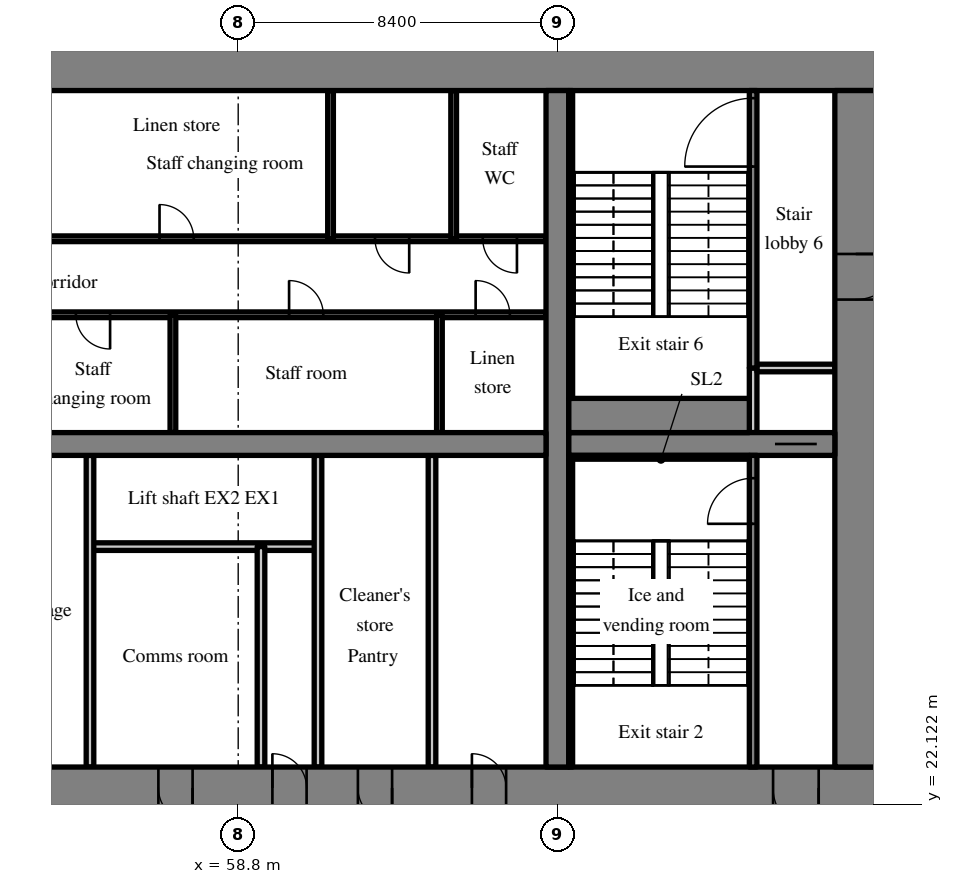
"""IFC4 building model, lengths in metres.
Left out: names, types, materials, properties, quantities, classifications, styles, units other than length and angle.
Written with IfcOpenShell. Run it as: python <this file> out.ifc"""

import sys

from ifc_helpers import new_model, si_unit, direction, frame, frame_2d, origin, place, context, subcontext, project, spatial, rectangle, extrude, source, transform, mapped, element, fill, save


model = new_model("IFC4")
c1 = context("Model", 3, precision=1e-05, world=origin(), true_north=direction((0.0, 1.0)))
c2 = subcontext(c1, "Body", "Model", "MODEL_VIEW")
j1 = project(units=[si_unit("LENGTHUNIT", "METRE"), si_unit("PLANEANGLEUNIT", "RADIAN")], contexts=[c1])
p1 = place(None, origin())
s1 = spatial("IfcSite", under=j1, at=p1, CompositionType="ELEMENT")
p2 = place(p1, origin())
s2 = spatial("IfcBuilding", under=s1, at=p2, CompositionType="ELEMENT")
p3 = place(p2, frame((0.0, 0.0, 6.0)))
s3 = spatial("IfcBuildingStorey", under=s2, at=p3, CompositionType="ELEMENT", Elevation=6.0)
m1 = source(origin(), c2, "Body", "SweptSolid", [
    extrude(rectangle(XDim=50.4, YDim=1.1, at=frame_2d((25.2, 0.0))), origin(), (0.0, 0.0, 1.0), 5.12),
])
p4 = place(p3, frame((25.2, 22.55, 0.0), z_axis=(0.0, 0.0, 1.0), x_axis=(1.0, 0.0, 0.0)))
e1 = element("IfcWall", 1, at=p4, inside=s3, PredefinedType="SHEAR", context=c2, shape_type="MappedRepresentation", body=[
    mapped(m1, transform((0.0, 0.0, 0.0), scale=1.0)),
])
m2 = source(origin(), c2, "Body", "SweptSolid", [
    extrude(rectangle(XDim=1.8, YDim=2.1, at=frame_2d((0.9, 1.05))), frame((0.0, 0.56, 0.0), z_axis=(0.0, -1.0, 0.0), x_axis=(1.0, 0.0, 0.0)), (0.0, 0.0, 1.0), 1.12),
])
p5 = place(p4, frame((15.9, 0.0, 0.0)))
e2 = element("IfcOpeningElement", 2, at=p5, cuts=e1, PredefinedType="OPENING", context=c2, shape_type="MappedRepresentation", body=[
    mapped(m2, transform((0.0, 0.0, 0.0), scale=1.0)),
])
m3 = source(origin(), c2, "Body", "SweptSolid", [
    extrude(rectangle(XDim=1.2, YDim=2.1, at=frame_2d((0.6, 1.05))), frame((0.0, 0.56, 0.0), z_axis=(0.0, -1.0, 0.0), x_axis=(1.0, 0.0, 0.0)), (0.0, 0.0, 1.0), 1.12),
])
p6 = place(p4, frame((27.0, 0.0, 0.0)))
e3 = element("IfcOpeningElement", 3, at=p6, cuts=e1, PredefinedType="OPENING", context=c2, shape_type="MappedRepresentation", body=[
    mapped(m3, transform((0.0, 0.0, 0.0), scale=1.0)),
])
m4 = source(origin(), c2, "Body", "SweptSolid", [
    extrude(rectangle(XDim=0.9, YDim=2.1, at=frame_2d((0.45, 1.05))), frame((0.0, 0.56, 0.0), z_axis=(0.0, -1.0, 0.0), x_axis=(1.0, 0.0, 0.0)), (0.0, 0.0, 1.0), 1.12),
])
p7 = place(p4, frame((34.5, 0.0, 0.0)))
e4 = element("IfcOpeningElement", 4, at=p7, cuts=e1, PredefinedType="OPENING", context=c2, shape_type="MappedRepresentation", body=[
    mapped(m4, transform((0.0, 0.0, 0.0), scale=1.0)),
])
p8 = place(p4, frame((31.5, 0.0, 0.0)))
e5 = element("IfcOpeningElement", 5, at=p8, cuts=e1, PredefinedType="OPENING", context=c2, shape_type="MappedRepresentation", body=[
    mapped(m4, transform((0.0, 0.0, 0.0), scale=1.0)),
])
p9 = place(p4, frame((39.75, 0.0, 0.0)))
e6 = element("IfcOpeningElement", 6, at=p9, cuts=e1, PredefinedType="OPENING", context=c2, shape_type="MappedRepresentation", body=[
    mapped(m4, transform((0.0, 0.0, 0.0), scale=1.0)),
])
p10 = place(p4, frame((36.75, 0.0, 0.0)))
e7 = element("IfcOpeningElement", 7, at=p10, cuts=e1, PredefinedType="OPENING", context=c2, shape_type="MappedRepresentation", body=[
    mapped(m4, transform((0.0, 0.0, 0.0), scale=1.0)),
])
p11 = place(p4, frame((6.425, 0.0, 0.0)))
e8 = element("IfcOpeningElement", 8, at=p11, cuts=e1, PredefinedType="OPENING", context=c2, shape_type="MappedRepresentation", body=[
    mapped(m3, transform((0.0, 0.0, 0.0), scale=1.0)),
])
p12 = place(p4, frame((47.675, 0.0, 0.0)))
e9 = element("IfcOpeningElement", 9, at=p12, cuts=e1, PredefinedType="OPENING", context=c2, shape_type="MappedRepresentation", body=[
    mapped(m3, transform((0.0, 0.0, 0.0), scale=1.0)),
])
p13 = place(p3, frame((25.2, 41.45, 0.0), z_axis=(0.0, 0.0, 1.0), x_axis=(1.0, 0.0, 0.0)))
e10 = element("IfcWall", 10, at=p13, inside=s3, PredefinedType="SHEAR", context=c2, shape_type="MappedRepresentation", body=[
    mapped(m1, transform((0.0, 0.0, 0.0), scale=1.0)),
])
m5 = source(origin(), c2, "Body", "SweptSolid", [
    extrude(rectangle(XDim=17.8, YDim=1.1, at=frame_2d((8.9, 0.0))), origin(), (0.0, 0.0, 1.0), 5.12),
])
p14 = place(p3, frame((75.05, 23.1, 0.0), z_axis=(0.0, 0.0, 1.0), x_axis=(0.0, 1.0, 0.0)))
e11 = element("IfcWall", 11, at=p14, inside=s3, PredefinedType="SHEAR", context=c2, shape_type="MappedRepresentation", body=[
    mapped(m5, transform((0.0, 0.0, 0.0), scale=1.0)),
])
p15 = place(p14, frame((12.3, 0.0, 0.0)))
e12 = element("IfcOpeningElement", 12, at=p15, cuts=e11, PredefinedType="OPENING", context=c2, shape_type="MappedRepresentation", body=[
    mapped(m3, transform((0.0, 0.0, 0.0), scale=1.0)),
])
m6 = source(origin(), c2, "Body", "SweptSolid", [
    extrude(rectangle(XDim=17.8, YDim=0.6, at=frame_2d((8.9, 0.0))), origin(), (0.0, 0.0, 1.0), 5.12),
])
p16 = place(p3, frame((67.2, 23.1, 0.0), z_axis=(0.0, 0.0, 1.0), x_axis=(0.0, 1.0, 0.0)))
e13 = element("IfcWall", 13, at=p16, inside=s3, PredefinedType="SHEAR", context=c2, shape_type="MappedRepresentation", body=[
    mapped(m6, transform((0.0, 0.0, 0.0), scale=1.0)),
])
m7 = source(origin(), c2, "Body", "SweptSolid", [
    extrude(rectangle(XDim=16.2, YDim=0.6, at=frame_2d((8.1, 0.0))), origin(), (0.0, 0.0, 1.0), 5.12),
])
p17 = place(p3, frame((50.7, 31.6, 0.0), z_axis=(0.0, 0.0, 1.0), x_axis=(1.0, 0.0, 0.0)))
e14 = element("IfcWall", 14, at=p17, inside=s3, PredefinedType="SHEAR", context=c2, shape_type="MappedRepresentation", body=[
    mapped(m7, transform((0.0, 0.0, 0.0), scale=1.0)),
])
m8 = source(origin(), c2, "Body", "SweptSolid", [
    extrude(rectangle(XDim=1.0, YDim=2.1, at=frame_2d((0.5, 1.05))), frame((0.0, 0.31, 0.0), z_axis=(0.0, -1.0, 0.0), x_axis=(1.0, 0.0, 0.0)), (0.0, 0.0, 1.0), 0.62),
])
p18 = place(p17, frame((0.55, 0.0, 0.0)))
e15 = element("IfcOpeningElement", 15, at=p18, cuts=e14, PredefinedType="OPENING", context=c2, shape_type="MappedRepresentation", body=[
    mapped(m8, transform((0.0, 0.0, 0.0), scale=1.0)),
])
m9 = source(origin(), c2, "Body", "SweptSolid", [
    extrude(rectangle(XDim=7.0, YDim=0.6, at=frame_2d((3.5, 0.0))), origin(), (0.0, 0.0, 1.0), 5.12),
])
p19 = place(p3, frame((67.5, 31.6, 0.0), z_axis=(0.0, 0.0, 1.0), x_axis=(1.0, 0.0, 0.0)))
e16 = element("IfcWall", 16, at=p19, inside=s3, PredefinedType="SHEAR", context=c2, shape_type="MappedRepresentation", body=[
    mapped(m9, transform((0.0, 0.0, 0.0), scale=1.0)),
])
m10 = source(origin(), c2, "Body", "SweptSolid", [
    extrude(rectangle(XDim=1.1, YDim=2.1, at=frame_2d((0.55, 1.05))), frame((0.0, 0.31, 0.0), z_axis=(0.0, -1.0, 0.0), x_axis=(1.0, 0.0, 0.0)), (0.0, 0.0, 1.0), 0.62),
])
p20 = place(p19, frame((5.425, 0.0, 0.0)))
e17 = element("IfcOpeningElement", 17, at=p20, cuts=e16, PredefinedType="OPENING", context=c2, shape_type="MappedRepresentation", body=[
    mapped(m10, transform((0.0, 0.0, 0.0), scale=1.0)),
])
m11 = source(origin(), c2, "Body", "SweptSolid", [
    extrude(rectangle(XDim=6.0, YDim=0.2, at=frame_2d((3.0, 0.0))), origin(), (0.0, 0.0, 1.0), 5.12),
])
p21 = place(p3, frame((60.9, 28.9, 0.0), z_axis=(0.0, 0.0, 1.0), x_axis=(-1.0, 0.0, 0.0)))
e18 = element("IfcWall", 18, at=p21, inside=s3, PredefinedType="SOLIDWALL", context=c2, shape_type="MappedRepresentation", body=[
    mapped(m11, transform((0.0, 0.0, 0.0), scale=1.0)),
])
m12 = source(origin(), c2, "Body", "SweptSolid", [
    extrude(rectangle(XDim=8.2, YDim=0.2, at=frame_2d((4.1, 0.0))), origin(), (0.0, 0.0, 1.0), 5.12),
])
for number, where, z_axis, x_axis in (
    (19, (54.9, 23.1, 0.0), (0.0, 0.0, 1.0), (0.0, 1.0, 0.0)),
    (20, (60.9, 23.1, 0.0), (0.0, 0.0, 1.0), (0.0, 1.0, 0.0)),
):
    element("IfcWall", number, at=place(p3, frame(where, z_axis=z_axis, x_axis=x_axis)), inside=s3, PredefinedType="PARTITIONING", context=c2, shape_type="MappedRepresentation", body=[
        mapped(m12, transform((0.0, 0.0, 0.0), scale=1.0)),
    ])
m13 = source(origin(), c2, "Body", "SweptSolid", [
    extrude(rectangle(XDim=5.8, YDim=0.2, at=frame_2d((2.9, 0.0))), origin(), (0.0, 0.0, 1.0), 5.12),
])
p22 = place(p3, frame((59.4, 23.1, 0.0), z_axis=(0.0, 0.0, 1.0), x_axis=(0.0, 1.0, 0.0)))
e21 = element("IfcWall", 21, at=p22, inside=s3, PredefinedType="PARTITIONING", context=c2, shape_type="MappedRepresentation", body=[
    mapped(m13, transform((0.0, 0.0, 0.0), scale=1.0)),
])
p23 = place(p3, frame((63.9, 23.1, 0.0), z_axis=(0.0, 0.0, 1.0), x_axis=(0.0, 1.0, 0.0)))
e22 = element("IfcWall", 22, at=p23, inside=s3, PredefinedType="PARTITIONING", context=c2, shape_type="MappedRepresentation", body=[
    mapped(m12, transform((0.0, 0.0, 0.0), scale=1.0)),
])
m14 = source(origin(), c2, "Body", "SweptSolid", [
    extrude(rectangle(XDim=14.1, YDim=0.15, at=frame_2d((7.05, 0.0))), origin(), (0.0, 0.0, 1.0), 5.12),
])
p24 = place(p3, frame((66.9, 35.0, 0.0), z_axis=(0.0, 0.0, 1.0), x_axis=(-1.0, 0.0, 0.0)))
e23 = element("IfcWall", 23, at=p24, inside=s3, PredefinedType="PARTITIONING", context=c2, shape_type="MappedRepresentation", body=[
    mapped(m14, transform((0.0, 0.0, 0.0), scale=1.0)),
])
m15 = source(origin(), c2, "Body", "SweptSolid", [
    extrude(rectangle(XDim=0.9, YDim=2.1, at=frame_2d((0.45, 1.05))), frame((0.0, 0.085, 0.0), z_axis=(0.0, -1.0, 0.0), x_axis=(1.0, 0.0, 0.0)), (0.0, 0.0, 1.0), 0.17),
])
p25 = place(p24, frame((0.952, 0.0, 0.0)))
e24 = element("IfcOpeningElement", 24, at=p25, cuts=e23, PredefinedType="OPENING", context=c2, shape_type="MappedRepresentation", body=[
    mapped(m15, transform((0.0, 0.0, 0.0), scale=1.0)),
])
p26 = place(p24, frame((5.861, 0.0, 0.0)))
e25 = element("IfcOpeningElement", 25, at=p26, cuts=e23, PredefinedType="OPENING", context=c2, shape_type="MappedRepresentation", body=[
    mapped(m15, transform((0.0, 0.0, 0.0), scale=1.0)),
])
p27 = place(p24, frame((11.471, 0.0, 0.0)))
e26 = element("IfcOpeningElement", 26, at=p27, cuts=e23, PredefinedType="OPENING", context=c2, shape_type="MappedRepresentation", body=[
    mapped(m15, transform((0.0, 0.0, 0.0), scale=1.0)),
])
m16 = source(origin(), c2, "Body", "SweptSolid", [
    extrude(rectangle(XDim=16.2, YDim=0.15, at=frame_2d((8.1, 0.0))), origin(), (0.0, 0.0, 1.0), 5.12),
])
p28 = place(p3, frame((66.9, 37.0, 0.0), z_axis=(0.0, 0.0, 1.0), x_axis=(-1.0, 0.0, 0.0)))
e27 = element("IfcWall", 27, at=p28, inside=s3, PredefinedType="PARTITIONING", context=c2, shape_type="MappedRepresentation", body=[
    mapped(m16, transform((0.0, 0.0, 0.0), scale=1.0)),
])
p29 = place(p28, frame((0.765, 0.0, 0.0)))
e28 = element("IfcOpeningElement", 28, at=p29, cuts=e27, PredefinedType="OPENING", context=c2, shape_type="MappedRepresentation", body=[
    mapped(m15, transform((0.0, 0.0, 0.0), scale=1.0)),
])
p30 = place(p28, frame((3.6, 0.0, 0.0)))
e29 = element("IfcOpeningElement", 29, at=p30, cuts=e27, PredefinedType="OPENING", context=c2, shape_type="MappedRepresentation", body=[
    mapped(m15, transform((0.0, 0.0, 0.0), scale=1.0)),
])
p31 = place(p28, frame((9.27, 0.0, 0.0)))
e30 = element("IfcOpeningElement", 30, at=p31, cuts=e27, PredefinedType="OPENING", context=c2, shape_type="MappedRepresentation", body=[
    mapped(m15, transform((0.0, 0.0, 0.0), scale=1.0)),
])
p32 = place(p28, frame((14.535, 0.0, 0.0)))
e31 = element("IfcOpeningElement", 31, at=p32, cuts=e27, PredefinedType="OPENING", context=c2, shape_type="MappedRepresentation", body=[
    mapped(m15, transform((0.0, 0.0, 0.0), scale=1.0)),
])
m17 = source(origin(), c2, "Body", "SweptSolid", [
    extrude(rectangle(XDim=3.1, YDim=0.15, at=frame_2d((1.55, 0.0))), origin(), (0.0, 0.0, 1.0), 5.12),
])
for number, where, z_axis, x_axis in (
    (32, (64.095, 31.9, 0.0), (0.0, 0.0, 1.0), (0.0, 1.0, 0.0)),
    (33, (57.082, 31.9, 0.0), (0.0, 0.0, 1.0), (0.0, 1.0, 0.0)),
):
    element("IfcWall", number, at=place(p3, frame(where, z_axis=z_axis, x_axis=x_axis)), inside=s3, PredefinedType="PARTITIONING", context=c2, shape_type="MappedRepresentation", body=[
        mapped(m17, transform((0.0, 0.0, 0.0), scale=1.0)),
    ])
m18 = source(origin(), c2, "Body", "SweptSolid", [
    extrude(rectangle(XDim=3.9, YDim=0.15, at=frame_2d((1.95, 0.0))), origin(), (0.0, 0.0, 1.0), 5.12),
])
for number, where, z_axis, x_axis in (
    (34, (64.47, 37.0, 0.0), (0.0, 0.0, 1.0), (0.0, 1.0, 0.0)),
    (35, (61.23, 37.0, 0.0), (0.0, 0.0, 1.0), (0.0, 1.0, 0.0)),
):
    element("IfcWall", number, at=place(p3, frame(where, z_axis=z_axis, x_axis=x_axis)), inside=s3, PredefinedType="PARTITIONING", context=c2, shape_type="MappedRepresentation", body=[
        mapped(m18, transform((0.0, 0.0, 0.0), scale=1.0)),
    ])
m19 = source(origin(), c2, "Body", "SweptSolid", [
    extrude(rectangle(XDim=8.2, YDim=0.2, at=frame_2d((4.1, 0.0))), origin(), (0.0, 0.0, 1.0), 5.12),
])
p33 = place(p3, frame((72.35, 23.1, 0.0), z_axis=(0.0, 0.0, 1.0), x_axis=(0.0, 1.0, 0.0)))
e36 = element("IfcWall", 36, at=p33, inside=s3, PredefinedType="SOLIDWALL", context=c2, shape_type="MappedRepresentation", body=[
    mapped(m19, transform((0.0, 0.0, 0.0), scale=1.0)),
])
m20 = source(origin(), c2, "Body", "SweptSolid", [
    extrude(rectangle(XDim=1.2, YDim=2.1, at=frame_2d((0.6, 1.05))), frame((0.0, 0.11, 0.0), z_axis=(0.0, -1.0, 0.0), x_axis=(1.0, 0.0, 0.0)), (0.0, 0.0, 1.0), 0.22),
])
p34 = place(p33, frame((6.4, 0.0, 0.0)))
e37 = element("IfcOpeningElement", 37, at=p34, cuts=e36, PredefinedType="OPENING", context=c2, shape_type="MappedRepresentation", body=[
    mapped(m20, transform((0.0, 0.0, 0.0), scale=1.0)),
])
m21 = source(origin(), c2, "Body", "SweptSolid", [
    extrude(rectangle(XDim=1.7, YDim=0.2, at=frame_2d((0.85, 0.0))), origin(), (0.0, 0.0, 1.0), 5.12),
])
p35 = place(p3, frame((72.35, 31.9, 0.0), z_axis=(0.0, 0.0, 1.0), x_axis=(0.0, 1.0, 0.0)))
e38 = element("IfcWall", 38, at=p35, inside=s3, PredefinedType="SOLIDWALL", context=c2, shape_type="MappedRepresentation", body=[
    mapped(m21, transform((0.0, 0.0, 0.0), scale=1.0)),
])
m22 = source(origin(), c2, "Body", "SweptSolid", [
    extrude(rectangle(XDim=2.05, YDim=0.2, at=frame_2d((1.025, 0.0))), origin(), (0.0, 0.0, 1.0), 5.12),
])
p36 = place(p3, frame((72.45, 33.6, 0.0), z_axis=(0.0, 0.0, 1.0), x_axis=(1.0, 0.0, 0.0)))
e39 = element("IfcWall", 39, at=p36, inside=s3, PredefinedType="SOLIDWALL", context=c2, shape_type="MappedRepresentation", body=[
    mapped(m22, transform((0.0, 0.0, 0.0), scale=1.0)),
])
m23 = source(origin(), c2, "Body", "SweptSolid", [
    extrude(rectangle(XDim=7.3, YDim=0.2, at=frame_2d((3.65, 0.0))), origin(), (0.0, 0.0, 1.0), 5.12),
])
p37 = place(p3, frame((72.35, 33.6, 0.0), z_axis=(0.0, 0.0, 1.0), x_axis=(0.0, 1.0, 0.0)))
e40 = element("IfcWall", 40, at=p37, inside=s3, PredefinedType="SOLIDWALL", context=c2, shape_type="MappedRepresentation", body=[
    mapped(m23, transform((0.0, 0.0, 0.0), scale=1.0)),
])
m24 = source(origin(), c2, "Body", "SweptSolid", [
    extrude(rectangle(XDim=1.8, YDim=2.1, at=frame_2d((0.9, 1.05))), frame((0.0, 0.11, 0.0), z_axis=(0.0, -1.0, 0.0), x_axis=(1.0, 0.0, 0.0)), (0.0, 0.0, 1.0), 0.22),
])
p38 = place(p37, frame((5.3, 0.0, 0.0)))
e41 = element("IfcOpeningElement", 41, at=p38, cuts=e40, PredefinedType="OPENING", context=c2, shape_type="MappedRepresentation", body=[
    mapped(m24, transform((0.0, 0.0, 0.0), scale=1.0)),
])
m25 = source(origin(), c2, "Body", "SweptSolid", [
    extrude(rectangle(XDim=4.75, YDim=0.1, at=frame_2d((2.375, 0.0))), origin(), (0.0, 0.0, 1.0), 5.12),
])
p39 = place(p3, frame((67.5, 31.25, 0.0), z_axis=(0.0, 0.0, 1.0), x_axis=(1.0, 0.0, 0.0)))
e42 = element("IfcWall", 42, at=p39, inside=s3, PredefinedType="SOLIDWALL", context=c2, shape_type="MappedRepresentation", body=[
    mapped(m25, transform((0.0, 0.0, 0.0), scale=1.0)),
])
m26 = source(origin(), c2, "Body", "SweptSolid", [
    extrude(rectangle(XDim=8.1, YDim=0.1, at=frame_2d((4.05, 0.0))), origin(), (0.0, 0.0, 1.0), 5.12),
])
p40 = place(p3, frame((67.55, 23.1, 0.0), z_axis=(0.0, 0.0, 1.0), x_axis=(0.0, 1.0, 0.0)))
e43 = element("IfcWall", 43, at=p40, inside=s3, PredefinedType="SOLIDWALL", context=c2, shape_type="MappedRepresentation", body=[
    mapped(m26, transform((0.0, 0.0, 0.0), scale=1.0)),
])
m27 = source(origin(), c2, "Body", "SweptSolid", [
    extrude(rectangle(XDim=4.75, YDim=0.9, at=frame_2d((2.375, 0.0))), origin(), (0.0, 0.0, 1.0), 5.12),
])
p41 = place(p3, frame((67.5, 32.35, 0.0), z_axis=(0.0, 0.0, 1.0), x_axis=(1.0, 0.0, 0.0)))
e44 = element("IfcWall", 44, at=p41, inside=s3, PredefinedType="SOLIDWALL", context=c2, shape_type="MappedRepresentation", body=[
    mapped(m27, transform((0.0, 0.0, 0.0), scale=1.0)),
])
p42 = place(p3, frame((67.55, 32.8, 0.0), z_axis=(0.0, 0.0, 1.0), x_axis=(0.0, 1.0, 0.0)))
e45 = element("IfcWall", 45, at=p42, inside=s3, PredefinedType="SOLIDWALL", context=c2, shape_type="MappedRepresentation", body=[
    mapped(m26, transform((0.0, 0.0, 0.0), scale=1.0)),
])
m28 = source(origin(), c2, "Body", "SweptSolid", [
    extrude(rectangle(XDim=0.9, YDim=2.1, at=frame_2d((0.45, 1.05))), frame((0.0, 0.325, 0.0), z_axis=(0.0, -1.0, 0.0), x_axis=(1.0, 0.0, 0.0)), (0.0, 0.0, 1.0), 0.05),
])
p43 = place(p7, origin())
e46 = element("IfcDoor", 46, at=p43, inside=s3, OperationType="SINGLE_SWING_LEFT", PredefinedType="DOOR", context=c2, shape_type="MappedRepresentation", body=[
    mapped(m28, transform((0.0, 0.0, 0.0), scale=1.0)),
])
fill(e4, e46)
p44 = place(p8, origin())
e47 = element("IfcDoor", 47, at=p44, inside=s3, OperationType="SINGLE_SWING_RIGHT", PredefinedType="DOOR", context=c2, shape_type="MappedRepresentation", body=[
    mapped(m28, transform((0.0, 0.0, 0.0), scale=1.0)),
])
fill(e5, e47)
p45 = place(p9, origin())
e48 = element("IfcDoor", 48, at=p45, inside=s3, OperationType="SINGLE_SWING_LEFT", PredefinedType="DOOR", context=c2, shape_type="MappedRepresentation", body=[
    mapped(m28, transform((0.0, 0.0, 0.0), scale=1.0)),
])
fill(e6, e48)
p46 = place(p10, origin())
e49 = element("IfcDoor", 49, at=p46, inside=s3, OperationType="SINGLE_SWING_RIGHT", PredefinedType="DOOR", context=c2, shape_type="MappedRepresentation", body=[
    mapped(m28, transform((0.0, 0.0, 0.0), scale=1.0)),
])
fill(e7, e49)
m29 = source(origin(), c2, "Body", "SweptSolid", [
    extrude(rectangle(XDim=0.9, YDim=2.1, at=frame_2d((0.45, 1.05))), frame((0.0, 0.025, 0.0), z_axis=(0.0, -1.0, 0.0), x_axis=(1.0, 0.0, 0.0)), (0.0, 0.0, 1.0), 0.05),
])
p47 = place(p25, origin())
e50 = element("IfcDoor", 50, at=p47, inside=s3, OperationType="SINGLE_SWING_RIGHT", PredefinedType="DOOR", context=c2, shape_type="MappedRepresentation", body=[
    mapped(m29, transform((0.0, 0.0, 0.0), scale=1.0)),
])
fill(e24, e50)
p48 = place(p26, origin())
e51 = element("IfcDoor", 51, at=p48, inside=s3, OperationType="SINGLE_SWING_RIGHT", PredefinedType="DOOR", context=c2, shape_type="MappedRepresentation", body=[
    mapped(m29, transform((0.0, 0.0, 0.0), scale=1.0)),
])
fill(e25, e51)
p49 = place(p27, origin())
e52 = element("IfcDoor", 52, at=p49, inside=s3, OperationType="SINGLE_SWING_LEFT", PredefinedType="DOOR", context=c2, shape_type="MappedRepresentation", body=[
    mapped(m29, transform((0.0, 0.0, 0.0), scale=1.0)),
])
fill(e26, e52)
p50 = place(p29, origin())
e53 = element("IfcDoor", 53, at=p50, inside=s3, OperationType="SINGLE_SWING_LEFT", PredefinedType="DOOR", context=c2, shape_type="MappedRepresentation", body=[
    mapped(m29, transform((0.0, 0.0, 0.0), scale=1.0)),
])
fill(e28, e53)
p51 = place(p30, origin())
e54 = element("IfcDoor", 54, at=p51, inside=s3, OperationType="SINGLE_SWING_LEFT", PredefinedType="DOOR", context=c2, shape_type="MappedRepresentation", body=[
    mapped(m29, transform((0.0, 0.0, 0.0), scale=1.0)),
])
fill(e29, e54)
p52 = place(p31, origin())
e55 = element("IfcDoor", 55, at=p52, inside=s3, OperationType="SINGLE_SWING_RIGHT", PredefinedType="DOOR", context=c2, shape_type="MappedRepresentation", body=[
    mapped(m29, transform((0.0, 0.0, 0.0), scale=1.0)),
])
fill(e30, e55)
m30 = source(origin(), c2, "Body", "SweptSolid", [
    extrude(rectangle(XDim=1.2, YDim=2.1, at=frame_2d((0.6, 1.05))), frame((0.0, 0.025, 0.0), z_axis=(0.0, -1.0, 0.0), x_axis=(1.0, 0.0, 0.0)), (0.0, 0.0, 1.0), 0.05),
])
p53 = place(p34, origin())
e56 = element("IfcDoor", 56, at=p53, inside=s3, OperationType="SINGLE_SWING_LEFT", PredefinedType="DOOR", context=c2, shape_type="MappedRepresentation", body=[
    mapped(m30, transform((0.0, 0.0, 0.0), scale=1.0)),
])
fill(e37, e56)
m31 = source(origin(), c2, "Body", "SweptSolid", [
    extrude(rectangle(XDim=1.2, YDim=2.1, at=frame_2d((0.6, 1.05))), frame((0.0, 0.325, 0.0), z_axis=(0.0, -1.0, 0.0), x_axis=(1.0, 0.0, 0.0)), (0.0, 0.0, 1.0), 0.05),
])
p54 = place(p12, origin())
e57 = element("IfcDoor", 57, at=p54, inside=s3, OperationType="SINGLE_SWING_RIGHT", PredefinedType="DOOR", context=c2, shape_type="MappedRepresentation", body=[
    mapped(m31, transform((0.0, 0.0, 0.0), scale=1.0)),
])
fill(e9, e57)
m32 = source(origin(), c2, "Body", "SweptSolid", [
    extrude(rectangle(XDim=1.1, YDim=2.1, at=frame_2d((0.55, 1.05))), frame((0.0, 0.025, 0.0), z_axis=(0.0, -1.0, 0.0), x_axis=(1.0, 0.0, 0.0)), (0.0, 0.0, 1.0), 0.05),
])
p55 = place(p20, origin())
e58 = element("IfcDoor", 58, at=p55, inside=s3, OperationType="SLIDING_TO_RIGHT", PredefinedType="DOOR", context=c2, shape_type="MappedRepresentation", body=[
    mapped(m32, transform((0.0, 0.0, 0.0), scale=1.0)),
])
fill(e17, e58)
m33 = source(origin(), c2, "Body", "SweptSolid", [
    extrude(rectangle(XDim=1.8, YDim=2.1, at=frame_2d((0.9, 1.05))), frame((0.0, 0.025, 0.0), z_axis=(0.0, -1.0, 0.0), x_axis=(1.0, 0.0, 0.0)), (0.0, 0.0, 1.0), 0.05),
])
p56 = place(p38, origin())
e59 = element("IfcDoor", 59, at=p56, inside=s3, OperationType="SINGLE_SWING_LEFT", PredefinedType="DOOR", context=c2, shape_type="MappedRepresentation", body=[
    mapped(m33, transform((0.0, 0.0, 0.0), scale=1.0)),
])
fill(e41, e59)
p57 = place(p15, origin())
e60 = element("IfcDoor", 60, at=p57, inside=s3, OperationType="SINGLE_SWING_RIGHT", PredefinedType="DOOR", context=c2, shape_type="MappedRepresentation", body=[
    mapped(m30, transform((0.0, 0.0, 0.0), scale=1.0)),
])
fill(e12, e60)
save(model, sys.argv[1])
